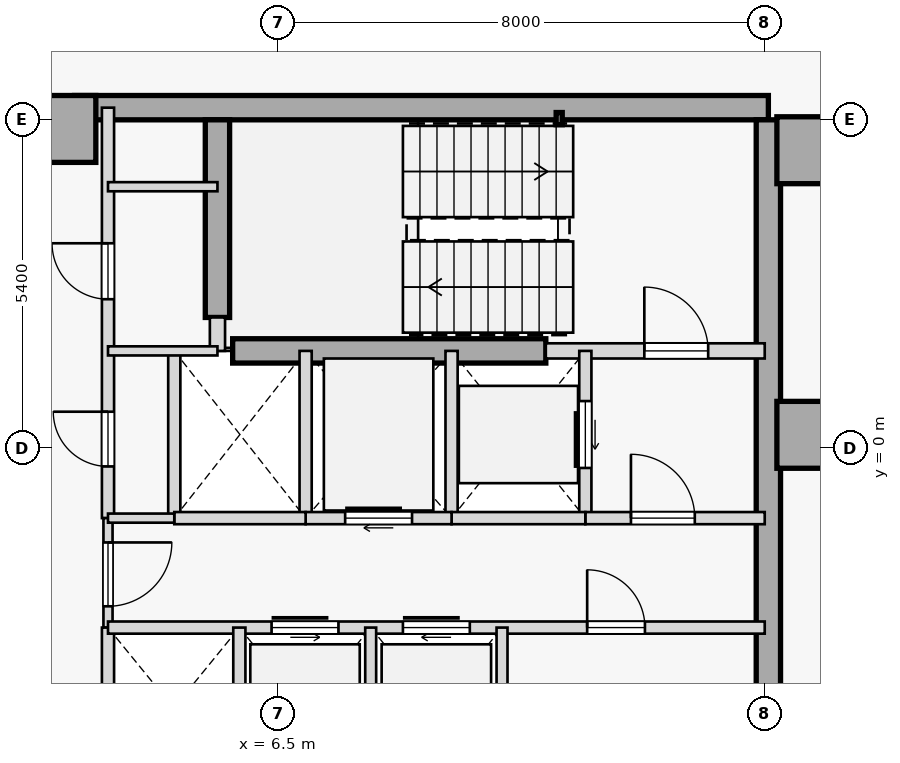
"""IFC4 building model, lengths in metres.
Left out: names, types, materials, properties, quantities, classifications, styles, units other than length and angle.
Written with IfcOpenShell. Run it as: python <this file> out.ifc"""

import sys

from ifc_helpers import new_model, si_unit, direction, frame, frame_2d, origin, origin_2d, place, context, subcontext, project, spatial, rectangle, hollow_rectangle, extrude, element, fill, save


model = new_model("IFC4")
c1 = context("Model", 3, precision=1e-05, world=origin(), true_north=direction((0.0, 1.0)))
c2 = subcontext(c1, "Body", "Model", "MODEL_VIEW")
j1 = project(units=[si_unit("LENGTHUNIT", "METRE"), si_unit("PLANEANGLEUNIT", "RADIAN")], contexts=[c1])
p1 = place(None, origin())
s1 = spatial("IfcSite", under=j1, at=p1, CompositionType="ELEMENT")
p2 = place(p1, origin())
s2 = spatial("IfcBuilding", under=s1, at=p2, CompositionType="ELEMENT")
p3 = place(p2, frame((0.0, 0.0, 102.2)))
s3 = spatial("IfcBuildingStorey", under=s2, at=p3, CompositionType="ELEMENT", Elevation=102.2)
for number, where, z_axis, x_axis in (
    (1, (15.25, 4.9, 0.0), (0.0, 0.0, 1.0), (1.0, 0.0, 0.0)),
    (2, (15.25, 0.22, 0.0), (0.0, 0.0, 1.0), (1.0, 0.0, 0.0)),
    (3, (2.95, 5.25, 0.0), (0.0, 0.0, 1.0), (1.0, 0.0, 0.0)),
):
    element("IfcColumn", number, at=place(p3, frame(where, z_axis=z_axis, x_axis=x_axis)), inside=s3, PredefinedType="COLUMN", context=c2, shape_type="SweptSolid", body=[
        extrude(rectangle(XDim=1.1, YDim=1.1, at=origin_2d()), origin(), (0.0, 0.0, 1.0), 3.7),
    ])
p4 = place(p3, frame((3.15, 5.6, 0.0), z_axis=(0.0, 0.0, 1.0), x_axis=(1.0, 0.0, 0.0)))
e4 = element("IfcWall", 4, at=p4, inside=s3, PredefinedType="SHEAR", context=c2, shape_type="SweptSolid", body=[
    extrude(rectangle(XDim=11.41, YDim=0.4, at=frame_2d((5.705, 0.0))), origin(), (0.0, 0.0, 1.0), 3.475),
])
p5 = place(p3, frame((14.56, -5.4, 0.0), z_axis=(0.0, 0.0, 1.0), x_axis=(0.0, 1.0, 0.0)))
e5 = element("IfcWall", 5, at=p5, inside=s3, PredefinedType="SHEAR", context=c2, shape_type="SweptSolid", body=[
    extrude(rectangle(XDim=10.8, YDim=0.4, at=frame_2d((5.4, 0.0))), origin(), (0.0, 0.0, 1.0), 3.475),
])
p6 = place(p3, frame((5.5, 2.15, 0.0), z_axis=(0.0, 0.0, 1.0), x_axis=(0.0, 1.0, 0.0)))
e6 = element("IfcWall", 6, at=p6, inside=s3, PredefinedType="SHEAR", context=c2, shape_type="SweptSolid", body=[
    extrude(rectangle(XDim=3.25, YDim=0.4, at=frame_2d((1.625, 0.0))), origin(), (0.0, 0.0, 1.0), 3.475),
])
p7 = place(p3, frame((5.75, 1.6, 0.0), z_axis=(0.0, 0.0, 1.0), x_axis=(1.0, 0.0, 0.0)))
e7 = element("IfcWall", 7, at=p7, inside=s3, PredefinedType="SHEAR", context=c2, shape_type="SweptSolid", body=[
    extrude(rectangle(XDim=5.15, YDim=0.4, at=frame_2d((2.575, 0.0))), origin(), (0.0, 0.0, 1.0), 3.475),
])
p8 = place(p3, frame((11.12, 5.42, 0.0), z_axis=(0.0, 0.0, 1.0), x_axis=(1.0, 0.0, 0.0)))
e8 = element("IfcColumn", 8, at=p8, inside=s3, PredefinedType="COLUMN", context=c2, shape_type="SweptSolid", body=[
    extrude(hollow_rectangle(XDim=0.1, YDim=0.2, WallThickness=0.008, at=origin_2d()), origin(), (0.0, 0.0, 1.0), 3.7),
])
p9 = place(p3, frame((10.9, 1.6, 0.0), z_axis=(0.0, 0.0, 1.0), x_axis=(1.0, 0.0, 0.0)))
e9 = element("IfcWall", 9, at=p9, inside=s3, PredefinedType="STANDARD", context=c2, shape_type="SweptSolid", body=[
    extrude(rectangle(XDim=3.6, YDim=0.25, at=frame_2d((1.8, 0.0))), origin(), (0.0, 0.0, 1.0), 3.475),
])
p10 = place(p9, frame((1.62, 0.0, 0.0)))
e10 = element("IfcOpeningElement", 10, at=p10, cuts=e9, PredefinedType="OPENING", context=c2, shape_type="SweptSolid", body=[
    extrude(rectangle(XDim=1.05, YDim=2.15, at=frame_2d((0.525, 1.075))), frame((0.0, 0.135, 0.0), z_axis=(0.0, -1.0, 0.0), x_axis=(1.0, 0.0, 0.0)), (0.0, 0.0, 1.0), 0.27),
])
p11 = place(p3, frame((5.5, 1.6, 0.0), z_axis=(0.0, 0.0, 1.0), x_axis=(0.0, 1.0, 0.0)))
e11 = element("IfcWall", 11, at=p11, inside=s3, PredefinedType="STANDARD", context=c2, shape_type="SweptSolid", body=[
    extrude(rectangle(XDim=0.55, YDim=0.25, at=frame_2d((0.275, 0.0))), origin(), (0.0, 0.0, 1.0), 3.475),
])
p12 = place(p3, frame((3.7, -1.15, 0.0), z_axis=(0.0, 0.0, 1.0), x_axis=(0.0, 1.0, 0.0)))
e12 = element("IfcWall", 12, at=p12, inside=s3, PredefinedType="STANDARD", context=c2, shape_type="SweptSolid", body=[
    extrude(rectangle(XDim=6.75, YDim=0.2, at=frame_2d((3.375, 0.0))), origin(), (0.0, 0.0, 1.0), 3.475),
])
p13 = place(p12, frame((3.6, 0.0, 0.0)))
e13 = element("IfcOpeningElement", 13, at=p13, cuts=e12, PredefinedType="OPENING", context=c2, shape_type="SweptSolid", body=[
    extrude(rectangle(XDim=0.92, YDim=2.15, at=frame_2d((0.46, 1.075))), frame((0.0, 0.11, 0.0), z_axis=(0.0, -1.0, 0.0), x_axis=(1.0, 0.0, 0.0)), (0.0, 0.0, 1.0), 0.22),
])
p14 = place(p12, frame((0.85, 0.0, 0.0)))
e14 = element("IfcOpeningElement", 14, at=p14, cuts=e12, PredefinedType="OPENING", context=c2, shape_type="SweptSolid", body=[
    extrude(rectangle(XDim=0.9, YDim=2.15, at=frame_2d((0.45, 1.075))), frame((0.0, 0.11, 0.0), z_axis=(0.0, -1.0, 0.0), x_axis=(1.0, 0.0, 0.0)), (0.0, 0.0, 1.0), 0.22),
])
p15 = place(p3, frame((3.7, -2.95, 0.0), z_axis=(0.0, 0.0, 1.0), x_axis=(0.0, 1.0, 0.0)))
e15 = element("IfcWall", 15, at=p15, inside=s3, PredefinedType="PARTITIONING", context=c2, shape_type="SweptSolid", body=[
    extrude(rectangle(XDim=1.8, YDim=0.15, at=frame_2d((0.9, 0.0))), origin(), (0.0, 0.0, 1.0), 3.475),
])
p16 = place(p15, frame((0.35, 0.0, 0.0)))
e16 = element("IfcOpeningElement", 16, at=p16, cuts=e15, PredefinedType="OPENING", context=c2, shape_type="SweptSolid", body=[
    extrude(rectangle(XDim=1.05, YDim=2.18, at=frame_2d((0.525, 1.09))), frame((0.0, 0.085, 0.0), z_axis=(0.0, -1.0, 0.0), x_axis=(1.0, 0.0, 0.0)), (0.0, 0.0, 1.0), 0.17),
])
p17 = place(p3, frame((3.7, -5.6, 0.0), z_axis=(0.0, 0.0, 1.0), x_axis=(0.0, 1.0, 0.0)))
e17 = element("IfcWall", 17, at=p17, inside=s3, PredefinedType="STANDARD", context=c2, shape_type="SweptSolid", body=[
    extrude(rectangle(XDim=2.65, YDim=0.2, at=frame_2d((1.325, 0.0))), origin(), (0.0, 0.0, 1.0), 3.475),
])
p18 = place(p3, frame((11.55, -1.15, 0.0), z_axis=(0.0, 0.0, 1.0), x_axis=(0.0, 1.0, 0.0)))
e18 = element("IfcWall", 18, at=p18, inside=s3, PredefinedType="STANDARD", context=c2, shape_type="SweptSolid", body=[
    extrude(rectangle(XDim=2.75, YDim=0.2, at=frame_2d((1.375, 0.0))), origin(), (0.0, 0.0, 1.0), 3.475),
])
p19 = place(p18, frame((0.825, 0.0, 0.0)))
e19 = element("IfcOpeningElement", 19, at=p19, cuts=e18, PredefinedType="OPENING", context=c2, shape_type="SweptSolid", body=[
    extrude(rectangle(XDim=1.1, YDim=2.15, at=frame_2d((0.55, 1.075))), frame((0.0, 0.11, 0.0), z_axis=(0.0, -1.0, 0.0), x_axis=(1.0, 0.0, 0.0)), (0.0, 0.0, 1.0), 0.22),
])
p20 = place(p3, frame((9.35, -1.15, 0.0), z_axis=(0.0, 0.0, 1.0), x_axis=(0.0, 1.0, 0.0)))
e20 = element("IfcWall", 20, at=p20, inside=s3, PredefinedType="STANDARD", context=c2, shape_type="SweptSolid", body=[
    extrude(rectangle(XDim=2.75, YDim=0.2, at=frame_2d((1.375, 0.0))), origin(), (0.0, 0.0, 1.0), 3.475),
])
p21 = place(p3, frame((11.55, -1.15, 0.0), z_axis=(0.0, 0.0, 1.0), x_axis=(1.0, 0.0, 0.0)))
e21 = element("IfcWall", 21, at=p21, inside=s3, PredefinedType="STANDARD", context=c2, shape_type="SweptSolid", body=[
    extrude(rectangle(XDim=2.95, YDim=0.2, at=frame_2d((1.475, 0.0))), origin(), (0.0, 0.0, 1.0), 3.475),
])
p22 = place(p21, frame((0.75, 0.0, 0.0)))
e22 = element("IfcOpeningElement", 22, at=p22, cuts=e21, PredefinedType="OPENING", context=c2, shape_type="SweptSolid", body=[
    extrude(rectangle(XDim=1.05, YDim=2.18, at=frame_2d((0.525, 1.09))), frame((0.0, 0.11, 0.0), z_axis=(0.0, -1.0, 0.0), x_axis=(1.0, 0.0, 0.0)), (0.0, 0.0, 1.0), 0.22),
])
p23 = place(p3, frame((9.35, -1.15, 0.0), z_axis=(0.0, 0.0, 1.0), x_axis=(1.0, 0.0, 0.0)))
e23 = element("IfcWall", 23, at=p23, inside=s3, PredefinedType="STANDARD", context=c2, shape_type="SweptSolid", body=[
    extrude(rectangle(XDim=2.2, YDim=0.2, at=frame_2d((1.1, 0.0))), origin(), (0.0, 0.0, 1.0), 3.475),
])
p24 = place(p3, frame((6.95, -1.15, 0.0), z_axis=(0.0, 0.0, 1.0), x_axis=(0.0, 1.0, 0.0)))
e24 = element("IfcWall", 24, at=p24, inside=s3, PredefinedType="STANDARD", context=c2, shape_type="SweptSolid", body=[
    extrude(rectangle(XDim=2.75, YDim=0.2, at=frame_2d((1.375, 0.0))), origin(), (0.0, 0.0, 1.0), 3.475),
])
p25 = place(p3, frame((6.95, -1.15, 0.0), z_axis=(0.0, 0.0, 1.0), x_axis=(1.0, 0.0, 0.0)))
e25 = element("IfcWall", 25, at=p25, inside=s3, PredefinedType="STANDARD", context=c2, shape_type="SweptSolid", body=[
    extrude(rectangle(XDim=2.4, YDim=0.2, at=frame_2d((1.2, 0.0))), origin(), (0.0, 0.0, 1.0), 3.475),
])
p26 = place(p25, frame((0.65, 0.0, 0.0)))
e26 = element("IfcOpeningElement", 26, at=p26, cuts=e25, PredefinedType="OPENING", context=c2, shape_type="SweptSolid", body=[
    extrude(rectangle(XDim=1.1, YDim=2.15, at=frame_2d((0.55, 1.075))), frame((0.0, 0.11, 0.0), z_axis=(0.0, -1.0, 0.0), x_axis=(1.0, 0.0, 0.0)), (0.0, 0.0, 1.0), 0.22),
])
p27 = place(p3, frame((4.79, -1.15, 0.0), z_axis=(0.0, 0.0, 1.0), x_axis=(0.0, 1.0, 0.0)))
e27 = element("IfcWall", 27, at=p27, inside=s3, PredefinedType="STANDARD", context=c2, shape_type="SweptSolid", body=[
    extrude(rectangle(XDim=2.75, YDim=0.2, at=frame_2d((1.375, 0.0))), origin(), (0.0, 0.0, 1.0), 3.475),
])
p28 = place(p3, frame((4.79, -1.15, 0.0), z_axis=(0.0, 0.0, 1.0), x_axis=(1.0, 0.0, 0.0)))
e28 = element("IfcWall", 28, at=p28, inside=s3, PredefinedType="STANDARD", context=c2, shape_type="SweptSolid", body=[
    extrude(rectangle(XDim=2.16, YDim=0.2, at=frame_2d((1.08, 0.0))), origin(), (0.0, 0.0, 1.0), 3.475),
])
p29 = place(p3, frame((3.7, -1.15, 0.0), z_axis=(0.0, 0.0, 1.0), x_axis=(1.0, 0.0, 0.0)))
e29 = element("IfcWall", 29, at=p29, inside=s3, PredefinedType="PARTITIONING", context=c2, shape_type="SweptSolid", body=[
    extrude(rectangle(XDim=1.09, YDim=0.15, at=frame_2d((0.545, 0.0))), origin(), (0.0, 0.0, 1.0), 3.475),
])
p30 = place(p3, frame((3.7, -2.95, 0.0), z_axis=(0.0, 0.0, 1.0), x_axis=(1.0, 0.0, 0.0)))
e30 = element("IfcWall", 30, at=p30, inside=s3, PredefinedType="STANDARD", context=c2, shape_type="SweptSolid", body=[
    extrude(rectangle(XDim=10.8, YDim=0.2, at=frame_2d((5.4, 0.0))), origin(), (0.0, 0.0, 1.0), 3.475),
])
p31 = place(p30, frame((2.69, 0.0, 0.0)))
e31 = element("IfcOpeningElement", 31, at=p31, cuts=e30, PredefinedType="OPENING", context=c2, shape_type="SweptSolid", body=[
    extrude(rectangle(XDim=1.1, YDim=2.15, at=frame_2d((0.55, 1.075))), frame((0.0, 0.11, 0.0), z_axis=(0.0, -1.0, 0.0), x_axis=(1.0, 0.0, 0.0)), (0.0, 0.0, 1.0), 0.22),
])
p32 = place(p30, frame((4.85, 0.0, 0.0)))
e32 = element("IfcOpeningElement", 32, at=p32, cuts=e30, PredefinedType="OPENING", context=c2, shape_type="SweptSolid", body=[
    extrude(rectangle(XDim=1.1, YDim=2.15, at=frame_2d((0.55, 1.075))), frame((0.0, 0.11, 0.0), z_axis=(0.0, -1.0, 0.0), x_axis=(1.0, 0.0, 0.0)), (0.0, 0.0, 1.0), 0.22),
])
p33 = place(p30, frame((7.88, 0.0, 0.0)))
e33 = element("IfcOpeningElement", 33, at=p33, cuts=e30, PredefinedType="OPENING", context=c2, shape_type="SweptSolid", body=[
    extrude(rectangle(XDim=0.95, YDim=2.15, at=frame_2d((0.475, 1.075))), frame((0.0, 0.11, 0.0), z_axis=(0.0, -1.0, 0.0), x_axis=(1.0, 0.0, 0.0)), (0.0, 0.0, 1.0), 0.22),
])
p34 = place(p3, frame((5.86, -5.6, 0.0), z_axis=(0.0, 0.0, 1.0), x_axis=(0.0, 1.0, 0.0)))
e34 = element("IfcWall", 34, at=p34, inside=s3, PredefinedType="STANDARD", context=c2, shape_type="SweptSolid", body=[
    extrude(rectangle(XDim=2.65, YDim=0.2, at=frame_2d((1.325, 0.0))), origin(), (0.0, 0.0, 1.0), 3.475),
])
for number, where, z_axis, x_axis in (
    (35, (10.18, -5.6, 0.0), (0.0, 0.0, 1.0), (0.0, 1.0, 0.0)),
    (36, (8.02, -5.6, 0.0), (0.0, 0.0, 1.0), (0.0, 1.0, 0.0)),
):
    element("IfcWall", number, at=place(p3, frame(where, z_axis=z_axis, x_axis=x_axis)), inside=s3, PredefinedType="STANDARD", context=c2, shape_type="SweptSolid", body=[
        extrude(rectangle(XDim=2.65, YDim=0.18, at=frame_2d((1.325, 0.0))), origin(), (0.0, 0.0, 1.0), 3.475),
    ])
for number, where, z_axis, x_axis in (
    (37, (3.7, 4.3, 0.0), (0.0, 0.0, 1.0), (1.0, 0.0, 0.0)),
    (38, (3.7, 1.6, 0.0), (0.0, 0.0, 1.0), (1.0, 0.0, 0.0)),
):
    element("IfcWall", number, at=place(p3, frame(where, z_axis=z_axis, x_axis=x_axis)), inside=s3, PredefinedType="PARTITIONING", context=c2, shape_type="SweptSolid", body=[
        extrude(rectangle(XDim=1.8, YDim=0.15, at=frame_2d((0.9, 0.0))), origin(), (0.0, 0.0, 1.0), 3.475),
    ])
p35 = place(p10, origin())
e39 = element("IfcDoor", 39, at=p35, inside=s3, OperationType="SINGLE_SWING_LEFT", PredefinedType="DOOR", context=c2, shape_type="SweptSolid", body=[
    extrude(rectangle(XDim=1.05, YDim=2.15, at=frame_2d((0.525, 1.075))), frame((0.0, 0.025, 0.0), z_axis=(0.0, -1.0, 0.0), x_axis=(1.0, 0.0, 0.0)), (0.0, 0.0, 1.0), 0.05),
])
fill(e10, e39)
p36 = place(p22, origin())
e40 = element("IfcDoor", 40, at=p36, inside=s3, OperationType="SINGLE_SWING_LEFT", PredefinedType="DOOR", context=c2, shape_type="SweptSolid", body=[
    extrude(rectangle(XDim=1.05, YDim=2.18, at=frame_2d((0.525, 1.09))), frame((0.0, 0.025, 0.0), z_axis=(0.0, -1.0, 0.0), x_axis=(1.0, 0.0, 0.0)), (0.0, 0.0, 1.0), 0.05),
])
fill(e22, e40)
p37 = place(p16, frame((1.05, 0.0, 0.0), z_axis=(0.0, 0.0, 1.0), x_axis=(-1.0, 0.0, 0.0)))
e41 = element("IfcDoor", 41, at=p37, inside=s3, OperationType="SINGLE_SWING_RIGHT", PredefinedType="DOOR", context=c2, shape_type="SweptSolid", body=[
    extrude(rectangle(XDim=1.05, YDim=2.18, at=frame_2d((0.525, 1.09))), frame((0.0, 0.025, 0.0), z_axis=(0.0, -1.0, 0.0), x_axis=(1.0, 0.0, 0.0)), (0.0, 0.0, 1.0), 0.05),
])
fill(e16, e41)
p38 = place(p19, origin())
e42 = element("IfcDoor", 42, at=p38, inside=s3, OperationType="SLIDING_TO_RIGHT", PredefinedType="DOOR", context=c2, shape_type="SweptSolid", body=[
    extrude(rectangle(XDim=1.1, YDim=2.15, at=frame_2d((0.55, 1.075))), frame((0.0, 0.025, 0.0), z_axis=(0.0, -1.0, 0.0), x_axis=(1.0, 0.0, 0.0)), (0.0, 0.0, 1.0), 0.05),
])
fill(e19, e42)
p39 = place(p26, origin())
e43 = element("IfcDoor", 43, at=p39, inside=s3, OperationType="SLIDING_TO_RIGHT", PredefinedType="DOOR", context=c2, shape_type="SweptSolid", body=[
    extrude(rectangle(XDim=1.1, YDim=2.15, at=frame_2d((0.55, 1.075))), frame((0.0, 0.025, 0.0), z_axis=(0.0, -1.0, 0.0), x_axis=(1.0, 0.0, 0.0)), (0.0, 0.0, 1.0), 0.05),
])
fill(e26, e43)
p40 = place(p31, origin())
e44 = element("IfcDoor", 44, at=p40, inside=s3, OperationType="SLIDING_TO_LEFT", PredefinedType="DOOR", context=c2, shape_type="SweptSolid", body=[
    extrude(rectangle(XDim=1.1, YDim=2.15, at=frame_2d((0.55, 1.075))), frame((0.0, 0.025, 0.0), z_axis=(0.0, -1.0, 0.0), x_axis=(1.0, 0.0, 0.0)), (0.0, 0.0, 1.0), 0.05),
])
fill(e31, e44)
p41 = place(p32, origin())
e45 = element("IfcDoor", 45, at=p41, inside=s3, OperationType="SLIDING_TO_RIGHT", PredefinedType="DOOR", context=c2, shape_type="SweptSolid", body=[
    extrude(rectangle(XDim=1.1, YDim=2.15, at=frame_2d((0.55, 1.075))), frame((0.0, 0.025, 0.0), z_axis=(0.0, -1.0, 0.0), x_axis=(1.0, 0.0, 0.0)), (0.0, 0.0, 1.0), 0.05),
])
fill(e32, e45)
p42 = place(p33, origin())
e46 = element("IfcDoor", 46, at=p42, inside=s3, OperationType="SINGLE_SWING_LEFT", PredefinedType="DOOR", context=c2, shape_type="SweptSolid", body=[
    extrude(rectangle(XDim=0.95, YDim=2.15, at=frame_2d((0.475, 1.075))), frame((0.0, 0.025, 0.0), z_axis=(0.0, -1.0, 0.0), x_axis=(1.0, 0.0, 0.0)), (0.0, 0.0, 1.0), 0.05),
])
fill(e33, e46)
p43 = place(p13, origin())
e47 = element("IfcDoor", 47, at=p43, inside=s3, OperationType="SINGLE_SWING_RIGHT", PredefinedType="DOOR", context=c2, shape_type="SweptSolid", body=[
    extrude(rectangle(XDim=0.92, YDim=2.15, at=frame_2d((0.46, 1.075))), frame((0.0, 0.025, 0.0), z_axis=(0.0, -1.0, 0.0), x_axis=(1.0, 0.0, 0.0)), (0.0, 0.0, 1.0), 0.05),
])
fill(e13, e47)
p44 = place(p14, origin())
e48 = element("IfcDoor", 48, at=p44, inside=s3, OperationType="SINGLE_SWING_RIGHT", PredefinedType="DOOR", context=c2, shape_type="SweptSolid", body=[
    extrude(rectangle(XDim=0.9, YDim=2.15, at=frame_2d((0.45, 1.075))), frame((0.0, 0.025, 0.0), z_axis=(0.0, -1.0, 0.0), x_axis=(1.0, 0.0, 0.0)), (0.0, 0.0, 1.0), 0.05),
])
fill(e14, e48)
save(model, sys.argv[1])
